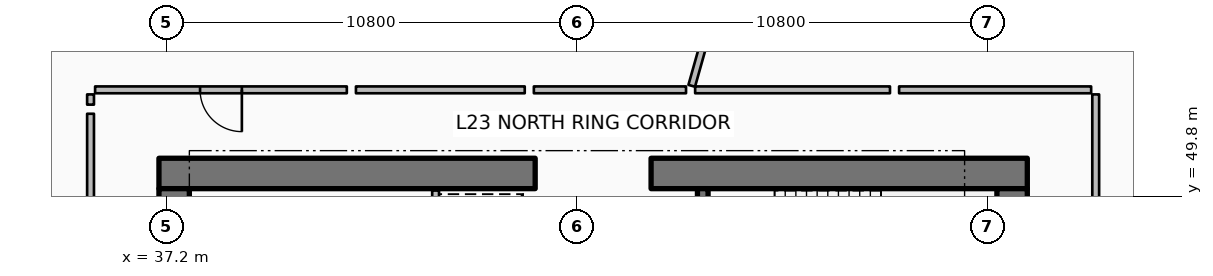
"""IFC4 building model, lengths in metres.
Left out: names, types, materials, properties, quantities, classifications, styles, units other than length and angle.
Written with IfcOpenShell. Run it as: python <this file> out.ifc"""

import sys

from ifc_helpers import new_model, si_unit, direction, frame, frame_2d, origin, place, context, subcontext, project, spatial, rectangle, extrude, element, fill, save


model = new_model("IFC4")
c1 = context("Model", 3, precision=1e-05, world=origin(), true_north=direction((0.0, 1.0)))
c2 = subcontext(c1, "Body", "Model", "MODEL_VIEW")
j1 = project(units=[si_unit("LENGTHUNIT", "METRE"), si_unit("PLANEANGLEUNIT", "RADIAN")], contexts=[c1])
p1 = place(None, origin())
s1 = spatial("IfcSite", under=j1, at=p1, CompositionType="ELEMENT")
p2 = place(p1, origin())
s2 = spatial("IfcBuilding", under=s1, at=p2, CompositionType="ELEMENT")
p3 = place(p2, frame((0.0, 0.0, 93.9)))
s3 = spatial("IfcBuildingStorey", under=s2, at=p3, CompositionType="ELEMENT", Elevation=93.9)
p4 = place(p3, frame((37.0, 50.4, 0.0), z_axis=(0.0, 0.0, 1.0), x_axis=(1.0, 0.0, 0.0)))
e1 = element("IfcWall", 1, at=p4, inside=s3, PredefinedType="SHEAR", context=c2, shape_type="SweptSolid", body=[
    extrude(rectangle(XDim=9.9, YDim=0.8, at=frame_2d((4.95, 0.0))), origin(), (0.0, 0.0, 1.0), 3.75),
])
p5 = place(p3, frame((49.95, 50.4, 0.0), z_axis=(0.0, 0.0, 1.0), x_axis=(1.0, 0.0, 0.0)))
e2 = element("IfcWall", 2, at=p5, inside=s3, PredefinedType="SHEAR", context=c2, shape_type="SweptSolid", body=[
    extrude(rectangle(XDim=9.9, YDim=0.8, at=frame_2d((4.95, 0.0))), origin(), (0.0, 0.0, 1.0), 3.75),
])
for number, where, z_axis, x_axis in (
    (3, (37.4, 34.0, 0.0), (0.0, 0.0, 1.0), (0.0, 1.0, 0.0)),
    (4, (59.45, 34.0, 0.0), (0.0, 0.0, 1.0), (0.0, 1.0, 0.0)),
):
    element("IfcWall", number, at=place(p3, frame(where, z_axis=z_axis, x_axis=x_axis)), inside=s3, PredefinedType="SHEAR", context=c2, shape_type="SweptSolid", body=[
        extrude(rectangle(XDim=16.0, YDim=0.8, at=frame_2d((8.0, 0.0))), origin(), (0.0, 0.0, 1.0), 3.75),
    ])
p6 = place(p3, frame((51.31, 46.5, 0.0), z_axis=(0.0, 0.0, 1.0), x_axis=(0.0, 1.0, 0.0)))
e5 = element("IfcWall", 5, at=p6, inside=s3, PredefinedType="SHEAR", context=c2, shape_type="SweptSolid", body=[
    extrude(rectangle(XDim=3.5, YDim=0.28, at=frame_2d((1.75, 0.0))), origin(), (0.0, 0.0, 1.0), 3.75),
])
p7 = place(p3, frame((44.28, 47.82, 0.0), z_axis=(0.0, 0.0, 1.0), x_axis=(0.0, 1.0, 0.0)))
e6 = element("IfcWall", 6, at=p7, inside=s3, PredefinedType="PARTITIONING", context=c2, shape_type="SweptSolid", body=[
    extrude(rectangle(XDim=2.13, YDim=0.18, at=frame_2d((1.065, 0.0))), origin(), (0.0, 0.0, 1.0), 3.5),
])
p8 = place(p3, frame((51.019, 52.706, 0.0), z_axis=(0.0, 0.0, 1.0), x_axis=(0.271450895995, 0.962452290279, 0.0)))
e7 = element("IfcWall", 7, at=p8, inside=s3, PredefinedType="PARTITIONING", context=c2, shape_type="SweptSolid", body=[
    extrude(rectangle(XDim=15.014, YDim=0.18, at=frame_2d((7.507, 0.0))), origin(), (0.0, 0.0, 1.0), 2.94),
])
p9 = place(p3, frame((41.944, 52.6, 0.0), z_axis=(0.0, 0.0, 1.0), x_axis=(-1.0, 0.0, 0.0)))
e8 = element("IfcWall", 8, at=p9, inside=s3, PredefinedType="PARTITIONING", context=c2, shape_type="SweptSolid", body=[
    extrude(rectangle(XDim=6.624, YDim=0.18, at=frame_2d((3.312, 0.0))), origin(), (0.0, 0.0, 1.0), 2.94),
])
p10 = place(p9, frame((2.762, 0.0, 0.0)))
e9 = element("IfcOpeningElement", 9, at=p10, cuts=e8, PredefinedType="OPENING", context=c2, shape_type="SweptSolid", body=[
    extrude(rectangle(XDim=1.1, YDim=2.1, at=frame_2d((0.55, 1.05))), frame((0.0, 0.1, 0.0), z_axis=(0.0, -1.0, 0.0), x_axis=(1.0, 0.0, 0.0)), (0.0, 0.0, 1.0), 0.2),
])
p11 = place(p3, frame((35.2, 52.48, 0.0), z_axis=(0.0, 0.0, 1.0), x_axis=(0.0, -1.0, 0.0)))
e10 = element("IfcWall", 10, at=p11, inside=s3, PredefinedType="PARTITIONING", context=c2, shape_type="SweptSolid", body=[
    extrude(rectangle(XDim=0.269, YDim=0.18, at=frame_2d((0.135, 0.0))), origin(), (0.0, 0.0, 1.0), 2.94),
])
p12 = place(p3, frame((50.869, 52.6, 0.0), z_axis=(0.0, 0.0, 1.0), x_axis=(-1.0, 0.0, 0.0)))
e11 = element("IfcWall", 11, at=p12, inside=s3, PredefinedType="PARTITIONING", context=c2, shape_type="SweptSolid", body=[
    extrude(rectangle(XDim=4.004, YDim=0.18, at=frame_2d((2.002, 0.0))), origin(), (0.0, 0.0, 1.0), 2.94),
])
p13 = place(p3, frame((46.625, 52.6, 0.0), z_axis=(0.0, 0.0, 1.0), x_axis=(-1.0, 0.0, 0.0)))
e12 = element("IfcWall", 12, at=p13, inside=s3, PredefinedType="PARTITIONING", context=c2, shape_type="SweptSolid", body=[
    extrude(rectangle(XDim=4.442, YDim=0.18, at=frame_2d((2.221, 0.0))), origin(), (0.0, 0.0, 1.0), 2.94),
])
p14 = place(p3, frame((35.2, 51.971, 0.0), z_axis=(0.0, 0.0, 1.0), x_axis=(0.0, -1.0, 0.0)))
e13 = element("IfcWall", 13, at=p14, inside=s3, PredefinedType="PARTITIONING", context=c2, shape_type="SweptSolid", body=[
    extrude(rectangle(XDim=6.241, YDim=0.18, at=frame_2d((3.12, 0.0))), origin(), (0.0, 0.0, 1.0), 2.94),
])
p15 = place(p3, frame((61.65, 49.764, 0.0), z_axis=(0.0, 0.0, 1.0), x_axis=(0.0, 1.0, 0.0)))
e14 = element("IfcWall", 14, at=p15, inside=s3, PredefinedType="PARTITIONING", context=c2, shape_type="SweptSolid", body=[
    extrude(rectangle(XDim=2.716, YDim=0.18, at=frame_2d((1.358, 0.0))), origin(), (0.0, 0.0, 1.0), 2.94),
])
p16 = place(p3, frame((61.53, 52.6, 0.0), z_axis=(0.0, 0.0, 1.0), x_axis=(-1.0, 0.0, 0.0)))
e15 = element("IfcWall", 15, at=p16, inside=s3, PredefinedType="PARTITIONING", context=c2, shape_type="SweptSolid", body=[
    extrude(rectangle(XDim=5.054, YDim=0.18, at=frame_2d((2.527, 0.0))), origin(), (0.0, 0.0, 1.0), 2.94),
])
p17 = place(p3, frame((56.236, 52.6, 0.0), z_axis=(0.0, 0.0, 1.0), x_axis=(-1.0, 0.0, 0.0)))
e16 = element("IfcWall", 16, at=p17, inside=s3, PredefinedType="PARTITIONING", context=c2, shape_type="SweptSolid", body=[
    extrude(rectangle(XDim=5.127, YDim=0.18, at=frame_2d((2.563, 0.0))), origin(), (0.0, 0.0, 1.0), 2.94),
])
p18 = place(p10, origin())
e17 = element("IfcDoor", 17, at=p18, inside=s3, OperationType="SINGLE_SWING_LEFT", PredefinedType="DOOR", context=c2, shape_type="SweptSolid", body=[
    extrude(rectangle(XDim=1.1, YDim=2.1, at=frame_2d((0.55, 1.05))), frame((0.0, 0.025, 0.0), z_axis=(0.0, -1.0, 0.0), x_axis=(1.0, 0.0, 0.0)), (0.0, 0.0, 1.0), 0.05),
])
fill(e9, e17)
save(model, sys.argv[1])
